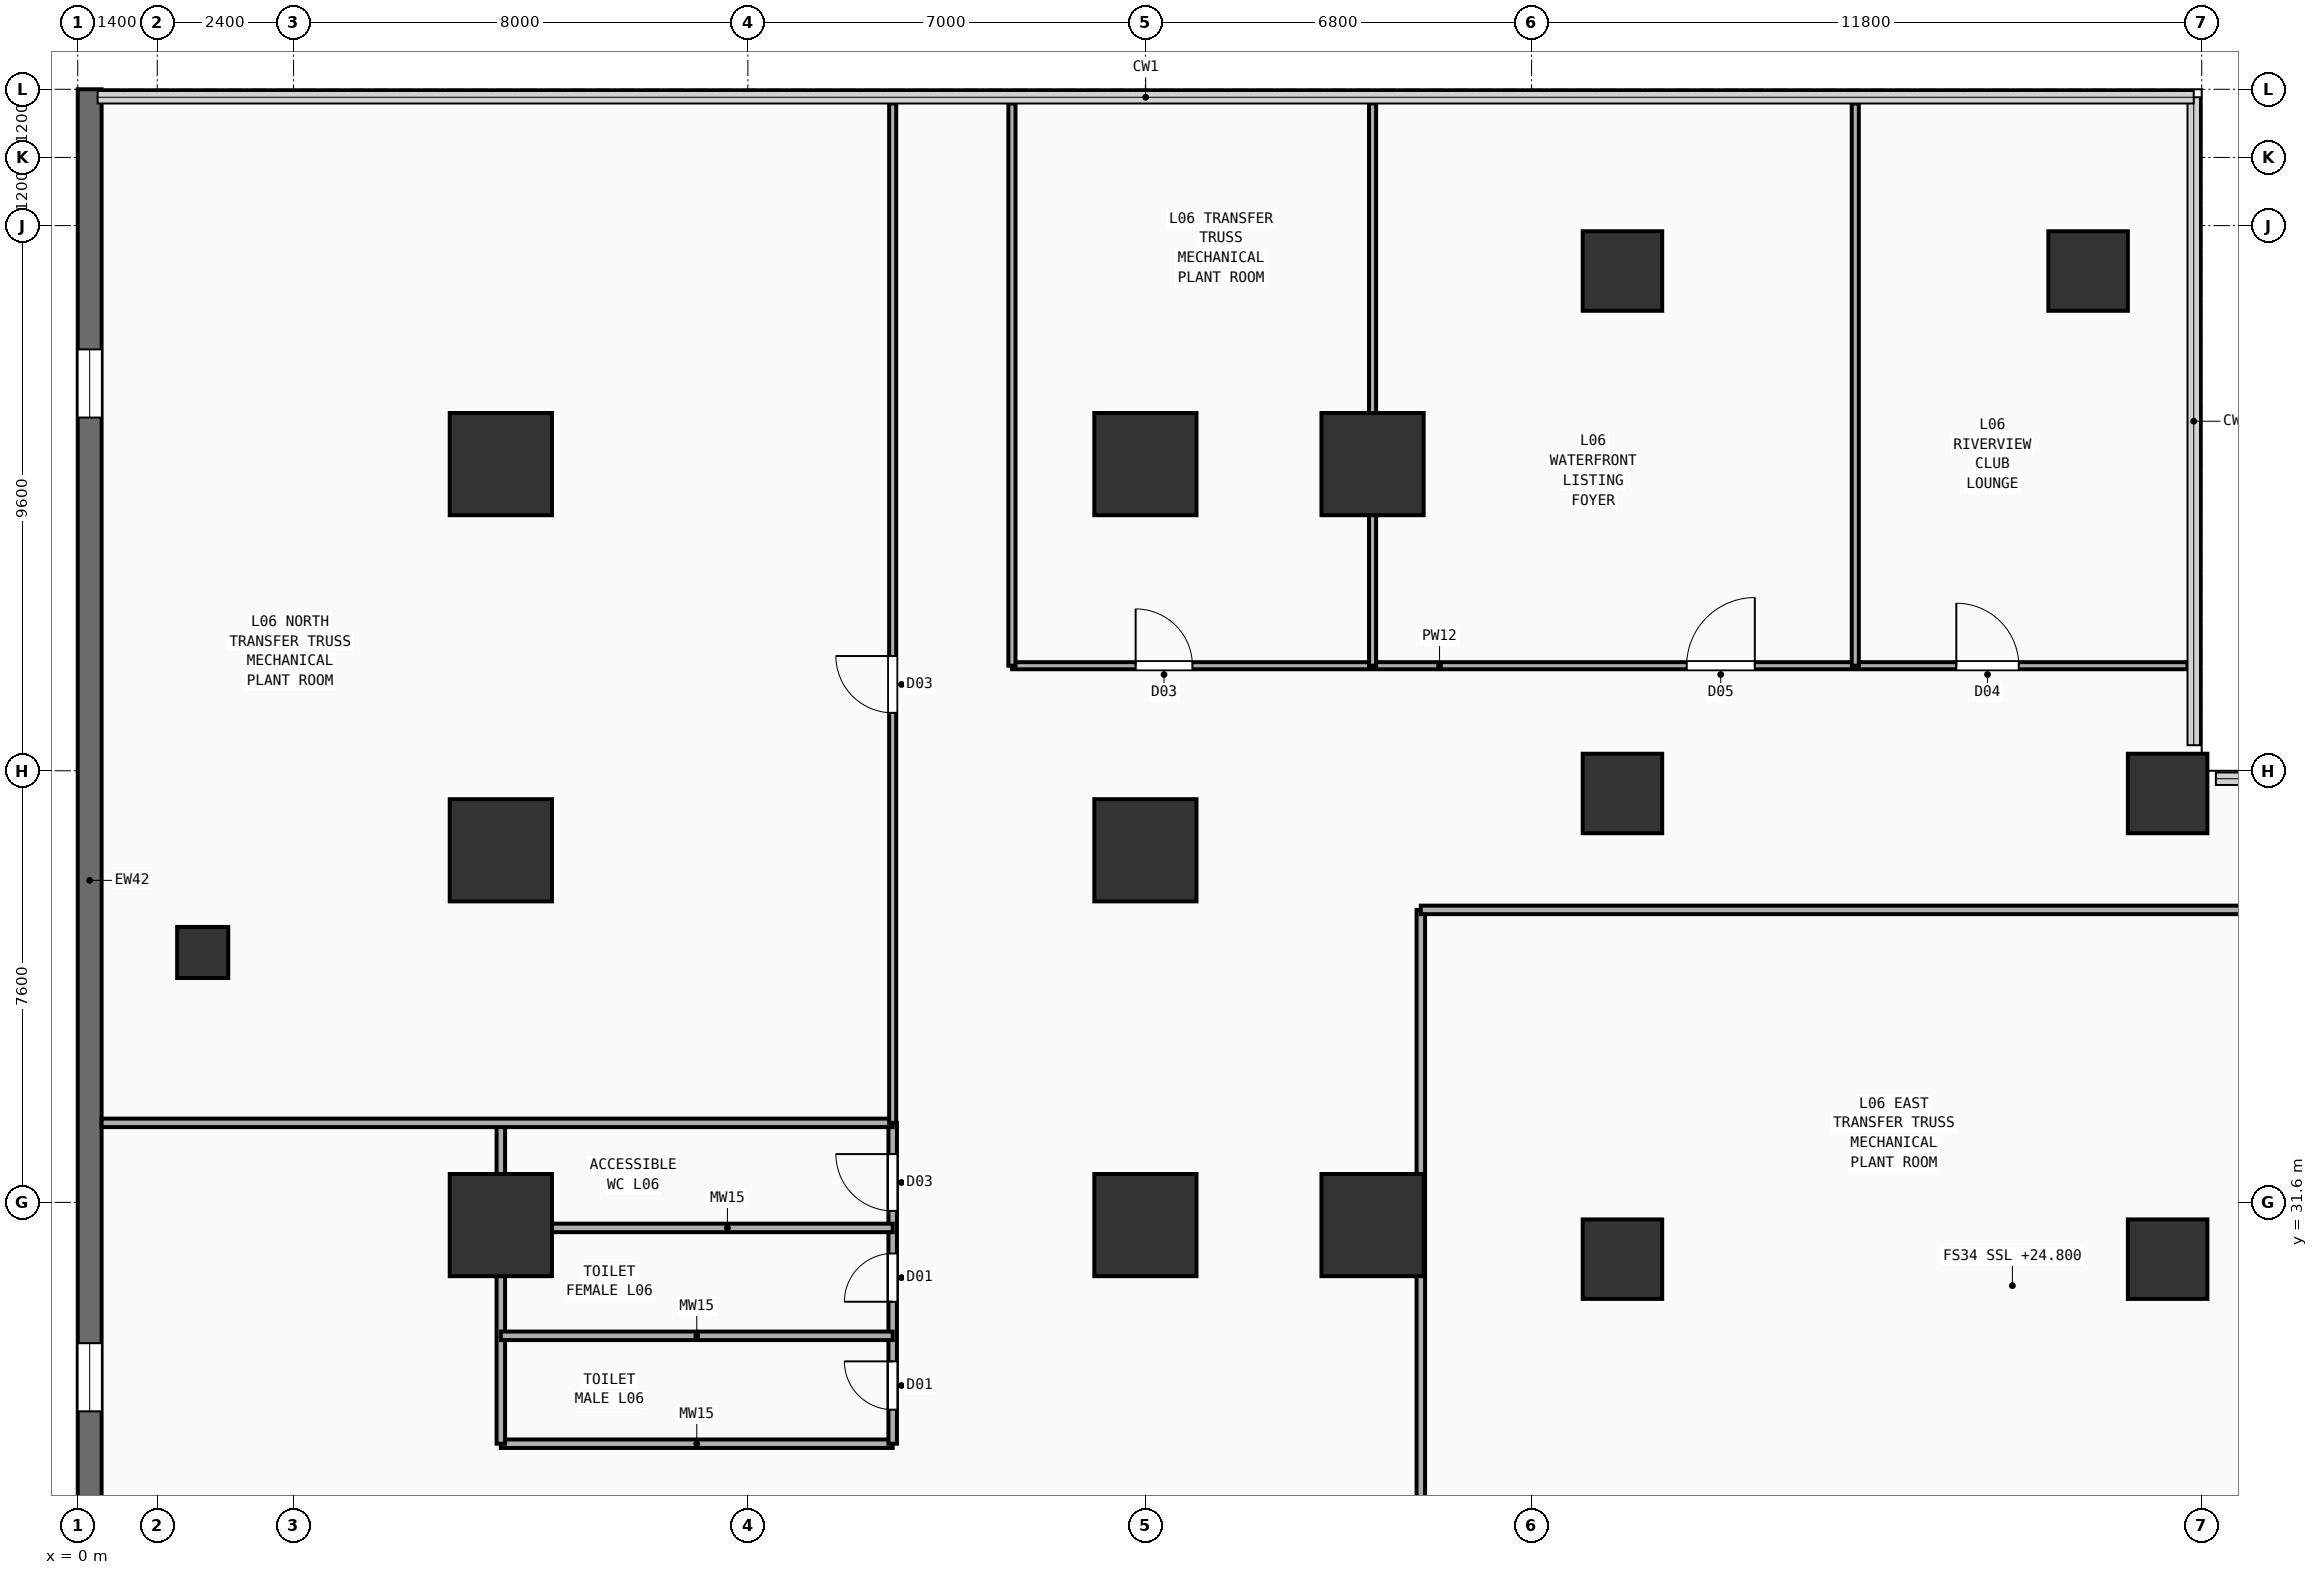
"""IFC4 building model, lengths in metres.
Left out: names, types, materials, properties, quantities, classifications, styles, units other than length and angle.
Written with IfcOpenShell. Run it as: python <this file> out.ifc"""

import sys

from ifc_helpers import new_model, si_unit, direction, frame, frame_2d, origin, origin_2d, place, context, subcontext, project, spatial, rectangle, extrude, element, fill, save


model = new_model("IFC4")
c1 = context("Model", 3, precision=1e-05, world=origin(), true_north=direction((0.0, 1.0)))
c2 = subcontext(c1, "Body", "Model", "MODEL_VIEW")
j1 = project(units=[si_unit("LENGTHUNIT", "METRE"), si_unit("PLANEANGLEUNIT", "RADIAN")], contexts=[c1])
p1 = place(None, origin())
s1 = spatial("IfcSite", under=j1, at=p1, CompositionType="ELEMENT")
p2 = place(p1, origin())
s2 = spatial("IfcBuilding", under=s1, at=p2, CompositionType="ELEMENT")
p3 = place(p2, frame((0.0, 0.0, 24.8)))
s3 = spatial("IfcBuildingStorey", under=s2, at=p3, CompositionType="ELEMENT", Elevation=24.8)
for number, where, z_axis, x_axis in (
    (1, (7.45, 31.2, 0.0), (0.0, 0.0, 1.0), (1.0, 0.0, 0.0)),
    (2, (7.45, 37.8, 0.0), (0.0, 0.0, 1.0), (1.0, 0.0, 0.0)),
    (3, (7.45, 44.6, 0.0), (0.0, 0.0, 1.0), (1.0, 0.0, 0.0)),
    (4, (18.8, 31.2, 0.0), (0.0, 0.0, 1.0), (1.0, 0.0, 0.0)),
    (5, (18.8, 37.8, 0.0), (0.0, 0.0, 1.0), (1.0, 0.0, 0.0)),
    (6, (18.8, 44.6, 0.0), (0.0, 0.0, 1.0), (1.0, 0.0, 0.0)),
    (7, (22.8, 31.2, 0.0), (0.0, 0.0, 1.0), (1.0, 0.0, 0.0)),
    (8, (22.8, 44.6, 0.0), (0.0, 0.0, 1.0), (1.0, 0.0, 0.0)),
):
    element("IfcColumn", number, at=place(p3, frame(where, z_axis=z_axis, x_axis=x_axis)), inside=s3, PredefinedType="COLUMN", context=c2, shape_type="SweptSolid", body=[
        extrude(rectangle(XDim=1.8, YDim=1.8, at=origin_2d()), origin(), (0.0, 0.0, 1.0), 4.35),
    ])
for number, where, z_axis, x_axis in (
    (9, (27.2, 30.6, 0.0), (0.0, 0.0, 1.0), (1.0, 0.0, 0.0)),
    (10, (36.8, 30.6, 0.0), (0.0, 0.0, 1.0), (1.0, 0.0, 0.0)),
    (11, (27.2, 38.8, 0.0), (0.0, 0.0, 1.0), (1.0, 0.0, 0.0)),
    (12, (36.8, 38.8, 0.0), (0.0, 0.0, 1.0), (1.0, 0.0, 0.0)),
    (13, (27.2, 48.0, 0.0), (0.0, 0.0, 1.0), (1.0, 0.0, 0.0)),
    (14, (35.4, 48.0, 0.0), (0.0, 0.0, 1.0), (1.0, 0.0, 0.0)),
):
    element("IfcColumn", number, at=place(p3, frame(where, z_axis=z_axis, x_axis=x_axis)), inside=s3, PredefinedType="COLUMN", context=c2, shape_type="SweptSolid", body=[
        extrude(rectangle(XDim=1.4, YDim=1.4, at=origin_2d()), origin(), (0.0, 0.0, 1.0), 4.35),
    ])
p4 = place(p3, frame((2.2, 36.0, 0.0), z_axis=(0.0, 0.0, 1.0), x_axis=(1.0, 0.0, 0.0)))
e15 = element("IfcColumn", 15, at=p4, inside=s3, PredefinedType="PILASTER", context=c2, shape_type="SweptSolid", body=[
    extrude(rectangle(XDim=0.9, YDim=0.9, at=origin_2d()), origin(), (0.0, 0.0, 1.0), 4.35),
])
p5 = place(p3, frame((0.21, 0.42, 0.0), z_axis=(0.0, 0.0, 1.0), x_axis=(0.0, 1.0, 0.0)))
e16 = element("IfcWall", 16, at=p5, inside=s3, PredefinedType="SOLIDWALL", context=c2, shape_type="SweptSolid", body=[
    extrude(rectangle(XDim=50.78, YDim=0.42, at=frame_2d((25.39, 0.0))), origin(), (0.0, 0.0, 1.0), 4.35),
])
p6 = place(p5, frame((8.0, 0.0, 0.95)))
e17 = element("IfcOpeningElement", 17, at=p6, cuts=e16, PredefinedType="OPENING", context=c2, shape_type="SweptSolid", body=[
    extrude(rectangle(XDim=1.2, YDim=1.6, at=frame_2d((0.6, 0.8))), frame((0.0, 0.22, 0.0), z_axis=(0.0, -1.0, 0.0), x_axis=(1.0, 0.0, 0.0)), (0.0, 0.0, 1.0), 0.44),
])
p7 = place(p5, frame((18.0, 0.0, 0.95)))
e18 = element("IfcOpeningElement", 18, at=p7, cuts=e16, PredefinedType="OPENING", context=c2, shape_type="SweptSolid", body=[
    extrude(rectangle(XDim=1.2, YDim=1.6, at=frame_2d((0.6, 0.8))), frame((0.0, 0.22, 0.0), z_axis=(0.0, -1.0, 0.0), x_axis=(1.0, 0.0, 0.0)), (0.0, 0.0, 1.0), 0.44),
])
p8 = place(p5, frame((27.5, 0.0, 0.95)))
e19 = element("IfcOpeningElement", 19, at=p8, cuts=e16, PredefinedType="OPENING", context=c2, shape_type="SweptSolid", body=[
    extrude(rectangle(XDim=1.2, YDim=1.6, at=frame_2d((0.6, 0.8))), frame((0.0, 0.22, 0.0), z_axis=(0.0, -1.0, 0.0), x_axis=(1.0, 0.0, 0.0)), (0.0, 0.0, 1.0), 0.44),
])
p9 = place(p5, frame((45.0, 0.0, 0.95)))
e20 = element("IfcOpeningElement", 20, at=p9, cuts=e16, PredefinedType="OPENING", context=c2, shape_type="SweptSolid", body=[
    extrude(rectangle(XDim=1.2, YDim=1.6, at=frame_2d((0.6, 0.8))), frame((0.0, 0.22, 0.0), z_axis=(0.0, -1.0, 0.0), x_axis=(1.0, 0.0, 0.0)), (0.0, 0.0, 1.0), 0.44),
])
p10 = place(p3, frame((7.45, 27.35, 0.0), z_axis=(0.0, 0.0, 1.0), x_axis=(1.0, 0.0, 0.0)))
e21 = element("IfcWall", 21, at=p10, inside=s3, PredefinedType="PLUMBINGWALL", context=c2, shape_type="SweptSolid", body=[
    extrude(rectangle(XDim=6.9, YDim=0.15, at=frame_2d((3.45, 0.0))), origin(), (0.0, 0.0, 1.0), 4.35),
])
p11 = place(p3, frame((7.45, 27.35, 0.0), z_axis=(0.0, 0.0, 1.0), x_axis=(0.0, 1.0, 0.0)))
e22 = element("IfcWall", 22, at=p11, inside=s3, PredefinedType="PLUMBINGWALL", context=c2, shape_type="SweptSolid", body=[
    extrude(rectangle(XDim=5.65, YDim=0.15, at=frame_2d((2.825, 0.0))), origin(), (0.0, 0.0, 1.0), 3.99),
])
p12 = place(p3, frame((14.35, 27.35, 0.0), z_axis=(0.0, 0.0, 1.0), x_axis=(0.0, 1.0, 0.0)))
e23 = element("IfcWall", 23, at=p12, inside=s3, PredefinedType="PLUMBINGWALL", context=c2, shape_type="SweptSolid", body=[
    extrude(rectangle(XDim=5.65, YDim=0.15, at=frame_2d((2.825, 0.0))), origin(), (0.0, 0.0, 1.0), 4.35),
])
p13 = place(p12, frame((0.6, 0.0, 0.0)))
e24 = element("IfcOpeningElement", 24, at=p13, cuts=e23, PredefinedType="OPENING", context=c2, shape_type="SweptSolid", body=[
    extrude(rectangle(XDim=0.85, YDim=2.15, at=frame_2d((0.425, 1.075))), frame((0.0, 0.085, 0.0), z_axis=(0.0, -1.0, 0.0), x_axis=(1.0, 0.0, 0.0)), (0.0, 0.0, 1.0), 0.17),
])
p14 = place(p12, frame((2.5, 0.0, 0.0)))
e25 = element("IfcOpeningElement", 25, at=p14, cuts=e23, PredefinedType="OPENING", context=c2, shape_type="SweptSolid", body=[
    extrude(rectangle(XDim=0.85, YDim=2.15, at=frame_2d((0.425, 1.075))), frame((0.0, 0.085, 0.0), z_axis=(0.0, -1.0, 0.0), x_axis=(1.0, 0.0, 0.0)), (0.0, 0.0, 1.0), 0.17),
])
p15 = place(p12, frame((4.1, 0.0, 0.0)))
e26 = element("IfcOpeningElement", 26, at=p15, cuts=e23, PredefinedType="OPENING", context=c2, shape_type="SweptSolid", body=[
    extrude(rectangle(XDim=1.0, YDim=2.2, at=frame_2d((0.5, 1.1))), frame((0.0, 0.085, 0.0), z_axis=(0.0, -1.0, 0.0), x_axis=(1.0, 0.0, 0.0)), (0.0, 0.0, 1.0), 0.17),
])
p16 = place(p3, frame((7.45, 29.25, 0.0), z_axis=(0.0, 0.0, 1.0), x_axis=(1.0, 0.0, 0.0)))
e27 = element("IfcWall", 27, at=p16, inside=s3, PredefinedType="PLUMBINGWALL", context=c2, shape_type="SweptSolid", body=[
    extrude(rectangle(XDim=6.9, YDim=0.15, at=frame_2d((3.45, 0.0))), origin(), (0.0, 0.0, 1.0), 3.85),
])
p17 = place(p3, frame((7.45, 31.15, 0.0), z_axis=(0.0, 0.0, 1.0), x_axis=(1.0, 0.0, 0.0)))
e28 = element("IfcWall", 28, at=p17, inside=s3, PredefinedType="PLUMBINGWALL", context=c2, shape_type="SweptSolid", body=[
    extrude(rectangle(XDim=6.9, YDim=0.15, at=frame_2d((3.45, 0.0))), origin(), (0.0, 0.0, 1.0), 3.322),
])
p18 = place(p3, frame((0.42, 33.0, 0.0), z_axis=(0.0, 0.0, 1.0), x_axis=(1.0, 0.0, 0.0)))
e29 = element("IfcWall", 29, at=p18, inside=s3, PredefinedType="PLUMBINGWALL", context=c2, shape_type="SweptSolid", body=[
    extrude(rectangle(XDim=13.93, YDim=0.15, at=frame_2d((6.965, 0.0))), origin(), (0.0, 0.0, 1.0), 4.35),
])
p19 = place(p3, frame((23.65, 16.35, 0.0), z_axis=(0.0, 0.0, 1.0), x_axis=(0.0, 1.0, 0.0)))
e30 = element("IfcWall", 30, at=p19, inside=s3, PredefinedType="PARTITIONING", context=c2, shape_type="SweptSolid", body=[
    extrude(rectangle(XDim=20.4, YDim=0.15, at=frame_2d((10.2, 0.0))), origin(), (0.0, 0.0, 1.0), 4.35),
])
p20 = place(p3, frame((23.65, 36.75, 0.0), z_axis=(0.0, 0.0, 1.0), x_axis=(1.0, 0.0, 0.0)))
e31 = element("IfcWall", 31, at=p20, inside=s3, PredefinedType="PARTITIONING", context=c2, shape_type="SweptSolid", body=[
    extrude(rectangle(XDim=40.9, YDim=0.15, at=frame_2d((20.45, 0.0))), origin(), (0.0, 0.0, 1.0), 4.35),
])
p21 = place(p3, frame((14.35, 33.0, 0.0), z_axis=(0.0, 0.0, 1.0), x_axis=(0.0, 1.0, 0.0)))
e32 = element("IfcWall", 32, at=p21, inside=s3, PredefinedType="PARTITIONING", context=c2, shape_type="SweptSolid", body=[
    extrude(rectangle(XDim=17.95, YDim=0.125, at=frame_2d((8.975, 0.0))), origin(), (0.0, 0.0, 1.0), 4.35),
])
p22 = place(p21, frame((7.22, 0.0, 0.0)))
e33 = element("IfcOpeningElement", 33, at=p22, cuts=e32, PredefinedType="OPENING", context=c2, shape_type="SweptSolid", body=[
    extrude(rectangle(XDim=1.0, YDim=2.2, at=frame_2d((0.5, 1.1))), frame((0.0, 0.073, 0.0), z_axis=(0.0, -1.0, 0.0), x_axis=(1.0, 0.0, 0.0)), (0.0, 0.0, 1.0), 0.145),
])
p23 = place(p3, frame((16.45, 41.05, 0.0), z_axis=(0.0, 0.0, 1.0), x_axis=(1.0, 0.0, 0.0)))
e34 = element("IfcWall", 34, at=p23, inside=s3, PredefinedType="PARTITIONING", context=c2, shape_type="SweptSolid", body=[
    extrude(rectangle(XDim=20.7, YDim=0.125, at=frame_2d((10.35, 0.0))), origin(), (0.0, 0.0, 1.0), 4.35),
])
p24 = place(p23, frame((2.178, 0.0, 0.0)))
e35 = element("IfcOpeningElement", 35, at=p24, cuts=e34, PredefinedType="OPENING", context=c2, shape_type="SweptSolid", body=[
    extrude(rectangle(XDim=1.0, YDim=2.2, at=frame_2d((0.5, 1.1))), frame((0.0, 0.073, 0.0), z_axis=(0.0, -1.0, 0.0), x_axis=(1.0, 0.0, 0.0)), (0.0, 0.0, 1.0), 0.145),
])
p25 = place(p23, frame((11.881, 0.0, 0.0)))
e36 = element("IfcOpeningElement", 36, at=p25, cuts=e34, PredefinedType="OPENING", context=c2, shape_type="SweptSolid", body=[
    extrude(rectangle(XDim=1.2, YDim=2.25, at=frame_2d((0.6, 1.125))), frame((0.0, 0.073, 0.0), z_axis=(0.0, -1.0, 0.0), x_axis=(1.0, 0.0, 0.0)), (0.0, 0.0, 1.0), 0.145),
])
p26 = place(p23, frame((16.629, 0.0, 0.0)))
e37 = element("IfcOpeningElement", 37, at=p26, cuts=e34, PredefinedType="OPENING", context=c2, shape_type="SweptSolid", body=[
    extrude(rectangle(XDim=1.1, YDim=2.2, at=frame_2d((0.55, 1.1))), frame((0.0, 0.073, 0.0), z_axis=(0.0, -1.0, 0.0), x_axis=(1.0, 0.0, 0.0)), (0.0, 0.0, 1.0), 0.145),
])
for number, where, z_axis, x_axis in (
    (38, (16.45, 41.05, 0.0), (0.0, 0.0, 1.0), (0.0, 1.0, 0.0)),
    (39, (22.8, 41.05, 0.0), (0.0, 0.0, 1.0), (0.0, 1.0, 0.0)),
    (40, (31.3, 41.05, 0.0), (0.0, 0.0, 1.0), (0.0, 1.0, 0.0)),
):
    element("IfcWall", number, at=place(p3, frame(where, z_axis=z_axis, x_axis=x_axis)), inside=s3, PredefinedType="PARTITIONING", context=c2, shape_type="SweptSolid", body=[
        extrude(rectangle(XDim=9.9, YDim=0.125, at=frame_2d((4.95, 0.0))), origin(), (0.0, 0.0, 1.0), 4.35),
    ])
p27 = place(p8, origin())
e41 = element("IfcWindow", 41, at=p27, inside=s3, PartitioningType="SINGLE_PANEL", PredefinedType="WINDOW", context=c2, shape_type="SweptSolid", body=[
    extrude(rectangle(XDim=1.2, YDim=1.6, at=frame_2d((0.6, 0.8))), frame((0.0, 0.03, 0.0), z_axis=(0.0, -1.0, 0.0), x_axis=(1.0, 0.0, 0.0)), (0.0, 0.0, 1.0), 0.06),
])
fill(e19, e41)
p28 = place(p9, origin())
e42 = element("IfcWindow", 42, at=p28, inside=s3, PartitioningType="SINGLE_PANEL", PredefinedType="WINDOW", context=c2, shape_type="SweptSolid", body=[
    extrude(rectangle(XDim=1.2, YDim=1.6, at=frame_2d((0.6, 0.8))), frame((0.0, 0.03, 0.0), z_axis=(0.0, -1.0, 0.0), x_axis=(1.0, 0.0, 0.0)), (0.0, 0.0, 1.0), 0.06),
])
fill(e20, e42)
p29 = place(p13, origin())
e43 = element("IfcDoor", 43, at=p29, inside=s3, OperationType="SINGLE_SWING_RIGHT", PredefinedType="DOOR", context=c2, shape_type="SweptSolid", body=[
    extrude(rectangle(XDim=0.85, YDim=2.15, at=frame_2d((0.425, 1.075))), frame((0.0, 0.025, 0.0), z_axis=(0.0, -1.0, 0.0), x_axis=(1.0, 0.0, 0.0)), (0.0, 0.0, 1.0), 0.05),
])
fill(e24, e43)
p30 = place(p14, origin())
e44 = element("IfcDoor", 44, at=p30, inside=s3, OperationType="SINGLE_SWING_LEFT", PredefinedType="DOOR", context=c2, shape_type="SweptSolid", body=[
    extrude(rectangle(XDim=0.85, YDim=2.15, at=frame_2d((0.425, 1.075))), frame((0.0, 0.025, 0.0), z_axis=(0.0, -1.0, 0.0), x_axis=(1.0, 0.0, 0.0)), (0.0, 0.0, 1.0), 0.05),
])
fill(e25, e44)
p31 = place(p15, origin())
e45 = element("IfcDoor", 45, at=p31, inside=s3, OperationType="SINGLE_SWING_RIGHT", PredefinedType="DOOR", context=c2, shape_type="SweptSolid", body=[
    extrude(rectangle(XDim=1.0, YDim=2.2, at=frame_2d((0.5, 1.1))), frame((0.0, 0.025, 0.0), z_axis=(0.0, -1.0, 0.0), x_axis=(1.0, 0.0, 0.0)), (0.0, 0.0, 1.0), 0.05),
])
fill(e26, e45)
p32 = place(p22, origin())
e46 = element("IfcDoor", 46, at=p32, inside=s3, OperationType="SINGLE_SWING_RIGHT", PredefinedType="DOOR", context=c2, shape_type="SweptSolid", body=[
    extrude(rectangle(XDim=1.0, YDim=2.2, at=frame_2d((0.5, 1.1))), frame((0.0, 0.025, 0.0), z_axis=(0.0, -1.0, 0.0), x_axis=(1.0, 0.0, 0.0)), (0.0, 0.0, 1.0), 0.05),
])
fill(e33, e46)
p33 = place(p24, origin())
e47 = element("IfcDoor", 47, at=p33, inside=s3, OperationType="SINGLE_SWING_LEFT", PredefinedType="DOOR", context=c2, shape_type="SweptSolid", body=[
    extrude(rectangle(XDim=1.0, YDim=2.2, at=frame_2d((0.5, 1.1))), frame((0.0, 0.025, 0.0), z_axis=(0.0, -1.0, 0.0), x_axis=(1.0, 0.0, 0.0)), (0.0, 0.0, 1.0), 0.05),
])
fill(e35, e47)
p34 = place(p25, origin())
e48 = element("IfcDoor", 48, at=p34, inside=s3, OperationType="SINGLE_SWING_RIGHT", PredefinedType="DOOR", context=c2, shape_type="SweptSolid", body=[
    extrude(rectangle(XDim=1.2, YDim=2.25, at=frame_2d((0.6, 1.125))), frame((0.0, 0.025, 0.0), z_axis=(0.0, -1.0, 0.0), x_axis=(1.0, 0.0, 0.0)), (0.0, 0.0, 1.0), 0.05),
])
fill(e36, e48)
p35 = place(p26, origin())
e49 = element("IfcDoor", 49, at=p35, inside=s3, OperationType="SINGLE_SWING_LEFT", PredefinedType="DOOR", context=c2, shape_type="SweptSolid", body=[
    extrude(rectangle(XDim=1.1, YDim=2.2, at=frame_2d((0.55, 1.1))), frame((0.0, 0.025, 0.0), z_axis=(0.0, -1.0, 0.0), x_axis=(1.0, 0.0, 0.0)), (0.0, 0.0, 1.0), 0.05),
])
fill(e37, e49)
save(model, sys.argv[1])
